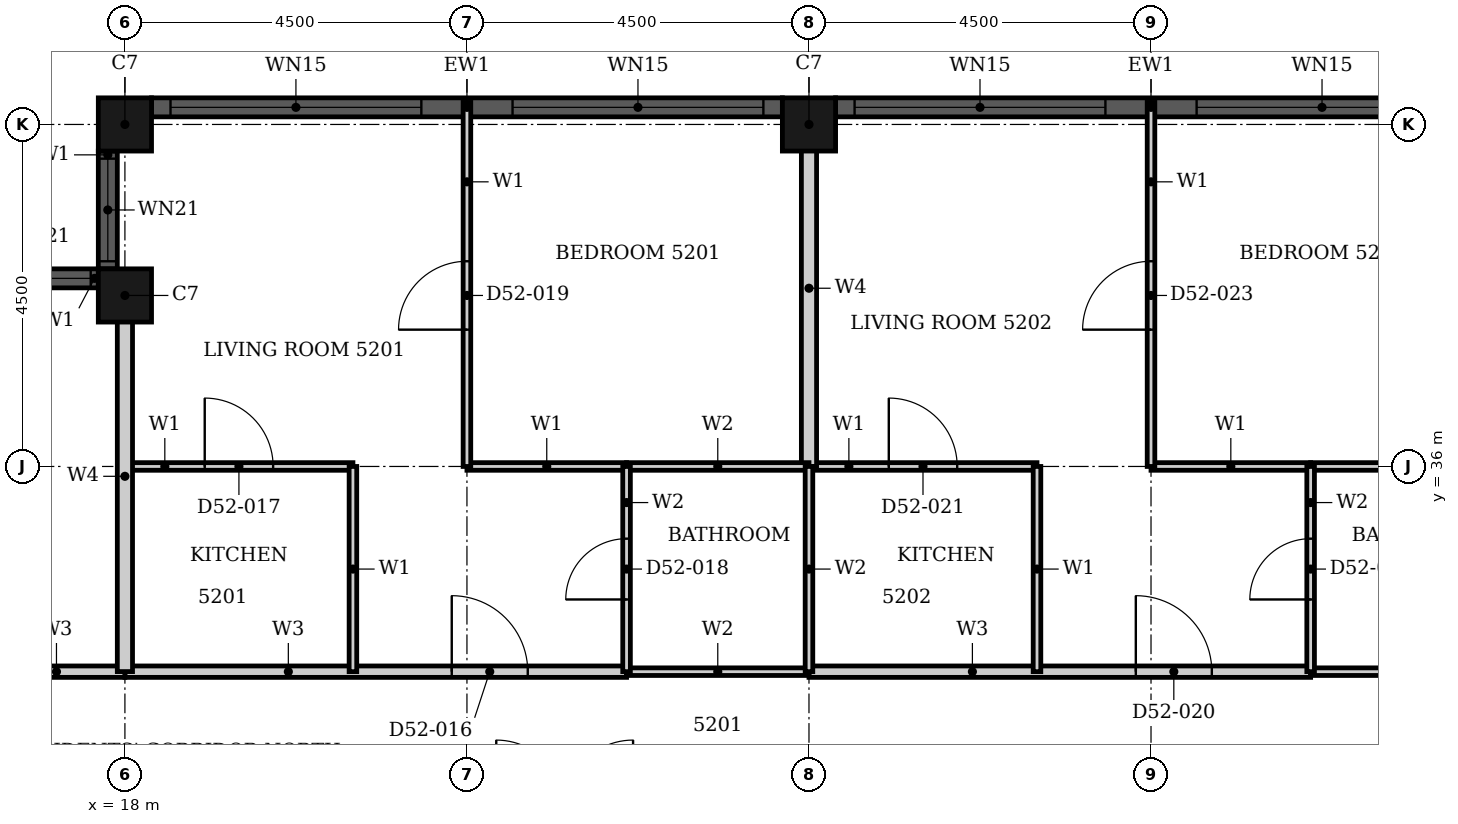
"""IFC4 building model, lengths in metres.
Left out: names, types, materials, properties, quantities, classifications, styles, units other than length and angle.
Written with IfcOpenShell. Run it as: python <this file> out.ifc"""

import sys

from ifc_helpers import new_model, si_unit, direction, frame, frame_2d, origin, origin_2d, place, context, subcontext, project, spatial, rectangle, hollow_rectangle, extrude, element, fill, save


model = new_model("IFC4")
c1 = context("Model", 3, precision=1e-05, world=origin(), true_north=direction((0.0, 1.0)))
c2 = subcontext(c1, "Body", "Model", "MODEL_VIEW")
j1 = project(units=[si_unit("LENGTHUNIT", "METRE"), si_unit("PLANEANGLEUNIT", "RADIAN")], contexts=[c1])
p1 = place(None, origin())
s1 = spatial("IfcSite", under=j1, at=p1, CompositionType="ELEMENT")
p2 = place(p1, origin())
s2 = spatial("IfcBuilding", under=s1, at=p2, CompositionType="ELEMENT")
p3 = place(p2, frame((0.0, 0.0, 207.2)))
s3 = spatial("IfcBuildingStorey", under=s2, at=p3, CompositionType="ELEMENT", Elevation=207.2)
for number, where, z_axis, x_axis in (
    (1, (27.0, 40.5, 0.0), (0.0, 0.0, 1.0), (1.0, 0.0, 0.0)),
    (2, (18.0, 40.5, 0.0), (0.0, 0.0, 1.0), (1.0, 0.0, 0.0)),
    (3, (18.0, 38.25, 0.0), (0.0, 0.0, 1.0), (1.0, 0.0, 0.0)),
):
    element("IfcColumn", number, at=place(p3, frame(where, z_axis=z_axis, x_axis=x_axis)), inside=s3, PredefinedType="COLUMN", context=c2, shape_type="SweptSolid", body=[
        extrude(hollow_rectangle(XDim=0.7, YDim=0.7, WallThickness=0.022, at=origin_2d()), origin(), (0.0, 0.0, 1.0), 3.7),
    ])
p4 = place(p3, frame((35.65, 40.725, 0.0), z_axis=(0.0, 0.0, 1.0), x_axis=(-1.0, 0.0, 0.0)))
e4 = element("IfcWall", 4, at=p4, inside=s3, PredefinedType="SOLIDWALL", context=c2, shape_type="SweptSolid", body=[
    extrude(rectangle(XDim=8.3, YDim=0.25, at=frame_2d((4.15, 0.0))), origin(), (0.0, 0.0, 1.0), 3.7),
])
p5 = place(p4, frame((0.25, 0.0, 0.45)))
e5 = element("IfcOpeningElement", 5, at=p5, cuts=e4, PredefinedType="OPENING", context=c2, shape_type="SweptSolid", body=[
    extrude(rectangle(XDim=3.3, YDim=2.3, at=frame_2d((1.65, 1.15))), frame((0.0, 0.135, 0.0), z_axis=(0.0, -1.0, 0.0), x_axis=(1.0, 0.0, 0.0)), (0.0, 0.0, 1.0), 0.27),
])
p6 = place(p4, frame((4.75, 0.0, 0.45)))
e6 = element("IfcOpeningElement", 6, at=p6, cuts=e4, PredefinedType="OPENING", context=c2, shape_type="SweptSolid", body=[
    extrude(rectangle(XDim=3.3, YDim=2.3, at=frame_2d((1.65, 1.15))), frame((0.0, 0.135, 0.0), z_axis=(0.0, -1.0, 0.0), x_axis=(1.0, 0.0, 0.0)), (0.0, 0.0, 1.0), 0.27),
])
p7 = place(p3, frame((26.65, 40.725, 0.0), z_axis=(0.0, 0.0, 1.0), x_axis=(-1.0, 0.0, 0.0)))
e7 = element("IfcWall", 7, at=p7, inside=s3, PredefinedType="SOLIDWALL", context=c2, shape_type="SweptSolid", body=[
    extrude(rectangle(XDim=8.3, YDim=0.25, at=frame_2d((4.15, 0.0))), origin(), (0.0, 0.0, 1.0), 3.7),
])
p8 = place(p7, frame((0.25, 0.0, 0.45)))
e8 = element("IfcOpeningElement", 8, at=p8, cuts=e7, PredefinedType="OPENING", context=c2, shape_type="SweptSolid", body=[
    extrude(rectangle(XDim=3.3, YDim=2.3, at=frame_2d((1.65, 1.15))), frame((0.0, 0.135, 0.0), z_axis=(0.0, -1.0, 0.0), x_axis=(1.0, 0.0, 0.0)), (0.0, 0.0, 1.0), 0.27),
])
p9 = place(p7, frame((4.75, 0.0, 0.45)))
e9 = element("IfcOpeningElement", 9, at=p9, cuts=e7, PredefinedType="OPENING", context=c2, shape_type="SweptSolid", body=[
    extrude(rectangle(XDim=3.3, YDim=2.3, at=frame_2d((1.65, 1.15))), frame((0.0, 0.135, 0.0), z_axis=(0.0, -1.0, 0.0), x_axis=(1.0, 0.0, 0.0)), (0.0, 0.0, 1.0), 0.27),
])
p10 = place(p3, frame((17.775, 40.15, 0.0), z_axis=(0.0, 0.0, 1.0), x_axis=(0.0, -1.0, 0.0)))
e10 = element("IfcWall", 10, at=p10, inside=s3, PredefinedType="SOLIDWALL", context=c2, shape_type="SweptSolid", body=[
    extrude(rectangle(XDim=1.55, YDim=0.25, at=frame_2d((0.775, 0.0))), origin(), (0.0, 0.0, 1.0), 3.7),
])
p11 = place(p10, frame((0.1, 0.0, 0.9)))
e11 = element("IfcOpeningElement", 11, at=p11, cuts=e10, PredefinedType="OPENING", context=c2, shape_type="SweptSolid", body=[
    extrude(rectangle(XDim=1.35, YDim=1.85, at=frame_2d((0.675, 0.925))), frame((0.0, 0.135, 0.0), z_axis=(0.0, -1.0, 0.0), x_axis=(1.0, 0.0, 0.0)), (0.0, 0.0, 1.0), 0.27),
])
p12 = place(p3, frame((17.65, 38.475, 0.0), z_axis=(0.0, 0.0, 1.0), x_axis=(-1.0, 0.0, 0.0)))
e12 = element("IfcWall", 12, at=p12, inside=s3, PredefinedType="SOLIDWALL", context=c2, shape_type="SweptSolid", body=[
    extrude(rectangle(XDim=1.55, YDim=0.25, at=frame_2d((0.775, 0.0))), origin(), (0.0, 0.0, 1.0), 3.7),
])
p13 = place(p12, frame((0.1, 0.0, 0.9)))
e13 = element("IfcOpeningElement", 13, at=p13, cuts=e12, PredefinedType="OPENING", context=c2, shape_type="SweptSolid", body=[
    extrude(rectangle(XDim=1.35, YDim=1.85, at=frame_2d((0.675, 0.925))), frame((0.0, 0.135, 0.0), z_axis=(0.0, -1.0, 0.0), x_axis=(1.0, 0.0, 0.0)), (0.0, 0.0, 1.0), 0.27),
])
p14 = place(p3, frame((18.0, 33.3, 0.0), z_axis=(0.0, 0.0, 1.0), x_axis=(1.0, 0.0, 0.0)))
e14 = element("IfcWall", 14, at=p14, inside=s3, PredefinedType="PARTITIONING", context=c2, shape_type="SweptSolid", body=[
    extrude(rectangle(XDim=6.6, YDim=0.15, at=frame_2d((3.3, 0.0))), origin(), (0.0, 0.0, 1.0), 3.4),
])
p15 = place(p14, frame((4.3, 0.0, 0.0)))
e15 = element("IfcOpeningElement", 15, at=p15, cuts=e14, PredefinedType="OPENING", context=c2, shape_type="SweptSolid", body=[
    extrude(rectangle(XDim=1.0, YDim=2.2, at=frame_2d((0.5, 1.1))), frame((0.0, 0.085, 0.0), z_axis=(0.0, -1.0, 0.0), x_axis=(1.0, 0.0, 0.0)), (0.0, 0.0, 1.0), 0.17),
])
p16 = place(p3, frame((27.0, 33.3, 0.0), z_axis=(0.0, 0.0, 1.0), x_axis=(1.0, 0.0, 0.0)))
e16 = element("IfcWall", 16, at=p16, inside=s3, PredefinedType="PARTITIONING", context=c2, shape_type="SweptSolid", body=[
    extrude(rectangle(XDim=6.6, YDim=0.15, at=frame_2d((3.3, 0.0))), origin(), (0.0, 0.0, 1.0), 3.4),
])
p17 = place(p16, frame((4.3, 0.0, 0.0)))
e17 = element("IfcOpeningElement", 17, at=p17, cuts=e16, PredefinedType="OPENING", context=c2, shape_type="SweptSolid", body=[
    extrude(rectangle(XDim=1.0, YDim=2.2, at=frame_2d((0.5, 1.1))), frame((0.0, 0.085, 0.0), z_axis=(0.0, -1.0, 0.0), x_axis=(1.0, 0.0, 0.0)), (0.0, 0.0, 1.0), 0.17),
])
p18 = place(p3, frame((16.2, 33.3, 0.0), z_axis=(0.0, 0.0, 1.0), x_axis=(1.0, 0.0, 0.0)))
e18 = element("IfcWall", 18, at=p18, inside=s3, PredefinedType="PARTITIONING", context=c2, shape_type="SweptSolid", body=[
    extrude(rectangle(XDim=1.799, YDim=0.15, at=frame_2d((0.899, 0.0))), origin(), (0.0, 0.0, 1.0), 3.4),
])
p19 = place(p3, frame((22.5, 36.0, 0.0), z_axis=(0.0, 0.0, 1.0), x_axis=(1.0, 0.0, 0.0)))
e19 = element("IfcWall", 19, at=p19, inside=s3, PredefinedType="PARTITIONING", context=c2, shape_type="SweptSolid", body=[
    extrude(rectangle(XDim=2.1, YDim=0.1, at=frame_2d((1.05, 0.0))), origin(), (0.0, 0.0, 1.0), 3.4),
])
p20 = place(p3, frame((18.0, 36.0, 0.0), z_axis=(0.0, 0.0, 1.0), x_axis=(1.0, 0.0, 0.0)))
e20 = element("IfcWall", 20, at=p20, inside=s3, PredefinedType="PARTITIONING", context=c2, shape_type="SweptSolid", body=[
    extrude(rectangle(XDim=3.0, YDim=0.1, at=frame_2d((1.5, 0.0))), origin(), (0.0, 0.0, 1.0), 3.4),
])
p21 = place(p20, frame((1.05, 0.0, 0.0)))
e21 = element("IfcOpeningElement", 21, at=p21, cuts=e20, PredefinedType="OPENING", context=c2, shape_type="SweptSolid", body=[
    extrude(rectangle(XDim=0.9, YDim=2.1, at=frame_2d((0.45, 1.05))), frame((0.0, 0.06, 0.0), z_axis=(0.0, -1.0, 0.0), x_axis=(1.0, 0.0, 0.0)), (0.0, 0.0, 1.0), 0.12),
])
p22 = place(p3, frame((31.5, 36.0, 0.0), z_axis=(0.0, 0.0, 1.0), x_axis=(1.0, 0.0, 0.0)))
e22 = element("IfcWall", 22, at=p22, inside=s3, PredefinedType="PARTITIONING", context=c2, shape_type="SweptSolid", body=[
    extrude(rectangle(XDim=2.1, YDim=0.1, at=frame_2d((1.05, 0.0))), origin(), (0.0, 0.0, 1.0), 3.4),
])
p23 = place(p3, frame((27.0, 36.0, 0.0), z_axis=(0.0, 0.0, 1.0), x_axis=(1.0, 0.0, 0.0)))
e23 = element("IfcWall", 23, at=p23, inside=s3, PredefinedType="PARTITIONING", context=c2, shape_type="SweptSolid", body=[
    extrude(rectangle(XDim=3.0, YDim=0.1, at=frame_2d((1.5, 0.0))), origin(), (0.0, 0.0, 1.0), 3.4),
])
p24 = place(p23, frame((1.05, 0.0, 0.0)))
e24 = element("IfcOpeningElement", 24, at=p24, cuts=e23, PredefinedType="OPENING", context=c2, shape_type="SweptSolid", body=[
    extrude(rectangle(XDim=0.9, YDim=2.1, at=frame_2d((0.45, 1.05))), frame((0.0, 0.06, 0.0), z_axis=(0.0, -1.0, 0.0), x_axis=(1.0, 0.0, 0.0)), (0.0, 0.0, 1.0), 0.12),
])
p25 = place(p3, frame((21.0, 33.3, 0.0), z_axis=(0.0, 0.0, 1.0), x_axis=(0.0, 1.0, 0.0)))
e25 = element("IfcWall", 25, at=p25, inside=s3, PredefinedType="PARTITIONING", context=c2, shape_type="SweptSolid", body=[
    extrude(rectangle(XDim=2.7, YDim=0.1, at=frame_2d((1.35, 0.0))), origin(), (0.0, 0.0, 1.0), 3.4),
])
p26 = place(p3, frame((22.5, 36.0, 0.0), z_axis=(0.0, 0.0, 1.0), x_axis=(0.0, 1.0, 0.0)))
e26 = element("IfcWall", 26, at=p26, inside=s3, PredefinedType="PARTITIONING", context=c2, shape_type="SweptSolid", body=[
    extrude(rectangle(XDim=4.79, YDim=0.1, at=frame_2d((2.395, 0.0))), origin(), (0.0, 0.0, 1.0), 3.4),
])
p27 = place(p26, frame((1.8, 0.0, 0.0)))
e27 = element("IfcOpeningElement", 27, at=p27, cuts=e26, PredefinedType="OPENING", context=c2, shape_type="SweptSolid", body=[
    extrude(rectangle(XDim=0.9, YDim=2.1, at=frame_2d((0.45, 1.05))), frame((0.0, 0.06, 0.0), z_axis=(0.0, -1.0, 0.0), x_axis=(1.0, 0.0, 0.0)), (0.0, 0.0, 1.0), 0.12),
])
p28 = place(p3, frame((30.0, 33.3, 0.0), z_axis=(0.0, 0.0, 1.0), x_axis=(0.0, 1.0, 0.0)))
e28 = element("IfcWall", 28, at=p28, inside=s3, PredefinedType="PARTITIONING", context=c2, shape_type="SweptSolid", body=[
    extrude(rectangle(XDim=2.7, YDim=0.1, at=frame_2d((1.35, 0.0))), origin(), (0.0, 0.0, 1.0), 3.4),
])
p29 = place(p3, frame((31.5, 36.0, 0.0), z_axis=(0.0, 0.0, 1.0), x_axis=(0.0, 1.0, 0.0)))
e29 = element("IfcWall", 29, at=p29, inside=s3, PredefinedType="PARTITIONING", context=c2, shape_type="SweptSolid", body=[
    extrude(rectangle(XDim=4.79, YDim=0.1, at=frame_2d((2.395, 0.0))), origin(), (0.0, 0.0, 1.0), 3.4),
])
p30 = place(p29, frame((1.8, 0.0, 0.0)))
e30 = element("IfcOpeningElement", 30, at=p30, cuts=e29, PredefinedType="OPENING", context=c2, shape_type="SweptSolid", body=[
    extrude(rectangle(XDim=0.9, YDim=2.1, at=frame_2d((0.45, 1.05))), frame((0.0, 0.06, 0.0), z_axis=(0.0, -1.0, 0.0), x_axis=(1.0, 0.0, 0.0)), (0.0, 0.0, 1.0), 0.12),
])
p31 = place(p3, frame((18.0, 33.301, 0.0), z_axis=(0.0, 0.0, 1.0), x_axis=(0.0, 1.0, 0.0)))
e31 = element("IfcWall", 31, at=p31, inside=s3, PredefinedType="PARTITIONING", context=c2, shape_type="SweptSolid", body=[
    extrude(rectangle(XDim=5.139, YDim=0.2, at=frame_2d((2.569, 0.0))), origin(), (0.0, 0.0, 1.0), 3.4),
])
p32 = place(p3, frame((27.0, 36.0, 0.0), z_axis=(0.0, 0.0, 1.0), x_axis=(0.0, 1.0, 0.0)))
e32 = element("IfcWall", 32, at=p32, inside=s3, PredefinedType="PARTITIONING", context=c2, shape_type="SweptSolid", body=[
    extrude(rectangle(XDim=4.69, YDim=0.2, at=frame_2d((2.345, 0.0))), origin(), (0.0, 0.0, 1.0), 3.4),
])
for number, where, z_axis, x_axis in (
    (33, (24.6, 33.3, 0.0), (0.0, 0.0, 1.0), (1.0, 0.0, 0.0)),
    (34, (33.6, 33.3, 0.0), (0.0, 0.0, 1.0), (1.0, 0.0, 0.0)),
    (35, (24.6, 36.0, 0.0), (0.0, 0.0, 1.0), (1.0, 0.0, 0.0)),
    (36, (33.6, 36.0, 0.0), (0.0, 0.0, 1.0), (1.0, 0.0, 0.0)),
):
    element("IfcWall", number, at=place(p3, frame(where, z_axis=z_axis, x_axis=x_axis)), inside=s3, PredefinedType="PARTITIONING", context=c2, shape_type="SweptSolid", body=[
        extrude(rectangle(XDim=2.4, YDim=0.1, at=frame_2d((1.2, 0.0))), origin(), (0.0, 0.0, 1.0), 3.4),
    ])
p33 = place(p3, frame((24.6, 33.3, 0.0), z_axis=(0.0, 0.0, 1.0), x_axis=(0.0, 1.0, 0.0)))
e37 = element("IfcWall", 37, at=p33, inside=s3, PredefinedType="PARTITIONING", context=c2, shape_type="SweptSolid", body=[
    extrude(rectangle(XDim=2.7, YDim=0.1, at=frame_2d((1.35, 0.0))), origin(), (0.0, 0.0, 1.0), 3.4),
])
p34 = place(p33, frame((0.95, 0.0, 0.0)))
e38 = element("IfcOpeningElement", 38, at=p34, cuts=e37, PredefinedType="OPENING", context=c2, shape_type="SweptSolid", body=[
    extrude(rectangle(XDim=0.8, YDim=2.1, at=frame_2d((0.4, 1.05))), frame((0.0, 0.06, 0.0), z_axis=(0.0, -1.0, 0.0), x_axis=(1.0, 0.0, 0.0)), (0.0, 0.0, 1.0), 0.12),
])
p35 = place(p3, frame((27.0, 33.3, 0.0), z_axis=(0.0, 0.0, 1.0), x_axis=(0.0, 1.0, 0.0)))
e39 = element("IfcWall", 39, at=p35, inside=s3, PredefinedType="PARTITIONING", context=c2, shape_type="SweptSolid", body=[
    extrude(rectangle(XDim=2.7, YDim=0.1, at=frame_2d((1.35, 0.0))), origin(), (0.0, 0.0, 1.0), 3.4),
])
p36 = place(p3, frame((33.6, 33.3, 0.0), z_axis=(0.0, 0.0, 1.0), x_axis=(0.0, 1.0, 0.0)))
e40 = element("IfcWall", 40, at=p36, inside=s3, PredefinedType="PARTITIONING", context=c2, shape_type="SweptSolid", body=[
    extrude(rectangle(XDim=2.7, YDim=0.1, at=frame_2d((1.35, 0.0))), origin(), (0.0, 0.0, 1.0), 3.4),
])
p37 = place(p36, frame((0.95, 0.0, 0.0)))
e41 = element("IfcOpeningElement", 41, at=p37, cuts=e40, PredefinedType="OPENING", context=c2, shape_type="SweptSolid", body=[
    extrude(rectangle(XDim=0.8, YDim=2.1, at=frame_2d((0.4, 1.05))), frame((0.0, 0.06, 0.0), z_axis=(0.0, -1.0, 0.0), x_axis=(1.0, 0.0, 0.0)), (0.0, 0.0, 1.0), 0.12),
])
p38 = place(p5, origin())
e42 = element("IfcWindow", 42, at=p38, inside=s3, PartitioningType="SINGLE_PANEL", PredefinedType="WINDOW", context=c2, shape_type="SweptSolid", body=[
    extrude(rectangle(XDim=3.3, YDim=2.3, at=frame_2d((1.65, 1.15))), frame((0.0, 0.03, 0.0), z_axis=(0.0, -1.0, 0.0), x_axis=(1.0, 0.0, 0.0)), (0.0, 0.0, 1.0), 0.06),
])
fill(e5, e42)
p39 = place(p6, origin())
e43 = element("IfcWindow", 43, at=p39, inside=s3, PartitioningType="SINGLE_PANEL", PredefinedType="WINDOW", context=c2, shape_type="SweptSolid", body=[
    extrude(rectangle(XDim=3.3, YDim=2.3, at=frame_2d((1.65, 1.15))), frame((0.0, 0.03, 0.0), z_axis=(0.0, -1.0, 0.0), x_axis=(1.0, 0.0, 0.0)), (0.0, 0.0, 1.0), 0.06),
])
fill(e6, e43)
p40 = place(p8, origin())
e44 = element("IfcWindow", 44, at=p40, inside=s3, PartitioningType="SINGLE_PANEL", PredefinedType="WINDOW", context=c2, shape_type="SweptSolid", body=[
    extrude(rectangle(XDim=3.3, YDim=2.3, at=frame_2d((1.65, 1.15))), frame((0.0, 0.03, 0.0), z_axis=(0.0, -1.0, 0.0), x_axis=(1.0, 0.0, 0.0)), (0.0, 0.0, 1.0), 0.06),
])
fill(e8, e44)
p41 = place(p9, origin())
e45 = element("IfcWindow", 45, at=p41, inside=s3, PartitioningType="SINGLE_PANEL", PredefinedType="WINDOW", context=c2, shape_type="SweptSolid", body=[
    extrude(rectangle(XDim=3.3, YDim=2.3, at=frame_2d((1.65, 1.15))), frame((0.0, 0.03, 0.0), z_axis=(0.0, -1.0, 0.0), x_axis=(1.0, 0.0, 0.0)), (0.0, 0.0, 1.0), 0.06),
])
fill(e9, e45)
p42 = place(p11, origin())
e46 = element("IfcWindow", 46, at=p42, inside=s3, PartitioningType="SINGLE_PANEL", PredefinedType="WINDOW", context=c2, shape_type="SweptSolid", body=[
    extrude(rectangle(XDim=1.35, YDim=1.85, at=frame_2d((0.675, 0.925))), frame((0.0, 0.03, 0.0), z_axis=(0.0, -1.0, 0.0), x_axis=(1.0, 0.0, 0.0)), (0.0, 0.0, 1.0), 0.06),
])
fill(e11, e46)
p43 = place(p13, origin())
e47 = element("IfcWindow", 47, at=p43, inside=s3, PartitioningType="SINGLE_PANEL", PredefinedType="WINDOW", context=c2, shape_type="SweptSolid", body=[
    extrude(rectangle(XDim=1.35, YDim=1.85, at=frame_2d((0.675, 0.925))), frame((0.0, 0.03, 0.0), z_axis=(0.0, -1.0, 0.0), x_axis=(1.0, 0.0, 0.0)), (0.0, 0.0, 1.0), 0.06),
])
fill(e13, e47)
p44 = place(p15, origin())
e48 = element("IfcDoor", 48, at=p44, inside=s3, OperationType="SINGLE_SWING_RIGHT", PredefinedType="DOOR", context=c2, shape_type="SweptSolid", body=[
    extrude(rectangle(XDim=1.0, YDim=2.2, at=frame_2d((0.5, 1.1))), frame((0.0, 0.025, 0.0), z_axis=(0.0, -1.0, 0.0), x_axis=(1.0, 0.0, 0.0)), (0.0, 0.0, 1.0), 0.05),
])
fill(e15, e48)
p45 = place(p21, origin())
e49 = element("IfcDoor", 49, at=p45, inside=s3, OperationType="SINGLE_SWING_RIGHT", PredefinedType="DOOR", context=c2, shape_type="SweptSolid", body=[
    extrude(rectangle(XDim=0.9, YDim=2.1, at=frame_2d((0.45, 1.05))), frame((0.0, 0.025, 0.0), z_axis=(0.0, -1.0, 0.0), x_axis=(1.0, 0.0, 0.0)), (0.0, 0.0, 1.0), 0.05),
])
fill(e21, e49)
p46 = place(p34, origin())
e50 = element("IfcDoor", 50, at=p46, inside=s3, OperationType="SINGLE_SWING_RIGHT", PredefinedType="DOOR", context=c2, shape_type="SweptSolid", body=[
    extrude(rectangle(XDim=0.8, YDim=2.1, at=frame_2d((0.4, 1.05))), frame((0.0, 0.025, 0.0), z_axis=(0.0, -1.0, 0.0), x_axis=(1.0, 0.0, 0.0)), (0.0, 0.0, 1.0), 0.05),
])
fill(e38, e50)
p47 = place(p27, origin())
e51 = element("IfcDoor", 51, at=p47, inside=s3, OperationType="SINGLE_SWING_LEFT", PredefinedType="DOOR", context=c2, shape_type="SweptSolid", body=[
    extrude(rectangle(XDim=0.9, YDim=2.1, at=frame_2d((0.45, 1.05))), frame((0.0, 0.025, 0.0), z_axis=(0.0, -1.0, 0.0), x_axis=(1.0, 0.0, 0.0)), (0.0, 0.0, 1.0), 0.05),
])
fill(e27, e51)
p48 = place(p17, origin())
e52 = element("IfcDoor", 52, at=p48, inside=s3, OperationType="SINGLE_SWING_RIGHT", PredefinedType="DOOR", context=c2, shape_type="SweptSolid", body=[
    extrude(rectangle(XDim=1.0, YDim=2.2, at=frame_2d((0.5, 1.1))), frame((0.0, 0.025, 0.0), z_axis=(0.0, -1.0, 0.0), x_axis=(1.0, 0.0, 0.0)), (0.0, 0.0, 1.0), 0.05),
])
fill(e17, e52)
p49 = place(p24, origin())
e53 = element("IfcDoor", 53, at=p49, inside=s3, OperationType="SINGLE_SWING_RIGHT", PredefinedType="DOOR", context=c2, shape_type="SweptSolid", body=[
    extrude(rectangle(XDim=0.9, YDim=2.1, at=frame_2d((0.45, 1.05))), frame((0.0, 0.025, 0.0), z_axis=(0.0, -1.0, 0.0), x_axis=(1.0, 0.0, 0.0)), (0.0, 0.0, 1.0), 0.05),
])
fill(e24, e53)
p50 = place(p37, origin())
e54 = element("IfcDoor", 54, at=p50, inside=s3, OperationType="SINGLE_SWING_LEFT", PredefinedType="DOOR", context=c2, shape_type="SweptSolid", body=[
    extrude(rectangle(XDim=0.8, YDim=2.1, at=frame_2d((0.4, 1.05))), frame((0.0, 0.025, 0.0), z_axis=(0.0, -1.0, 0.0), x_axis=(1.0, 0.0, 0.0)), (0.0, 0.0, 1.0), 0.05),
])
fill(e41, e54)
p51 = place(p30, origin())
e55 = element("IfcDoor", 55, at=p51, inside=s3, OperationType="SINGLE_SWING_RIGHT", PredefinedType="DOOR", context=c2, shape_type="SweptSolid", body=[
    extrude(rectangle(XDim=0.9, YDim=2.1, at=frame_2d((0.45, 1.05))), frame((0.0, 0.025, 0.0), z_axis=(0.0, -1.0, 0.0), x_axis=(1.0, 0.0, 0.0)), (0.0, 0.0, 1.0), 0.05),
])
fill(e30, e55)
save(model, sys.argv[1])
